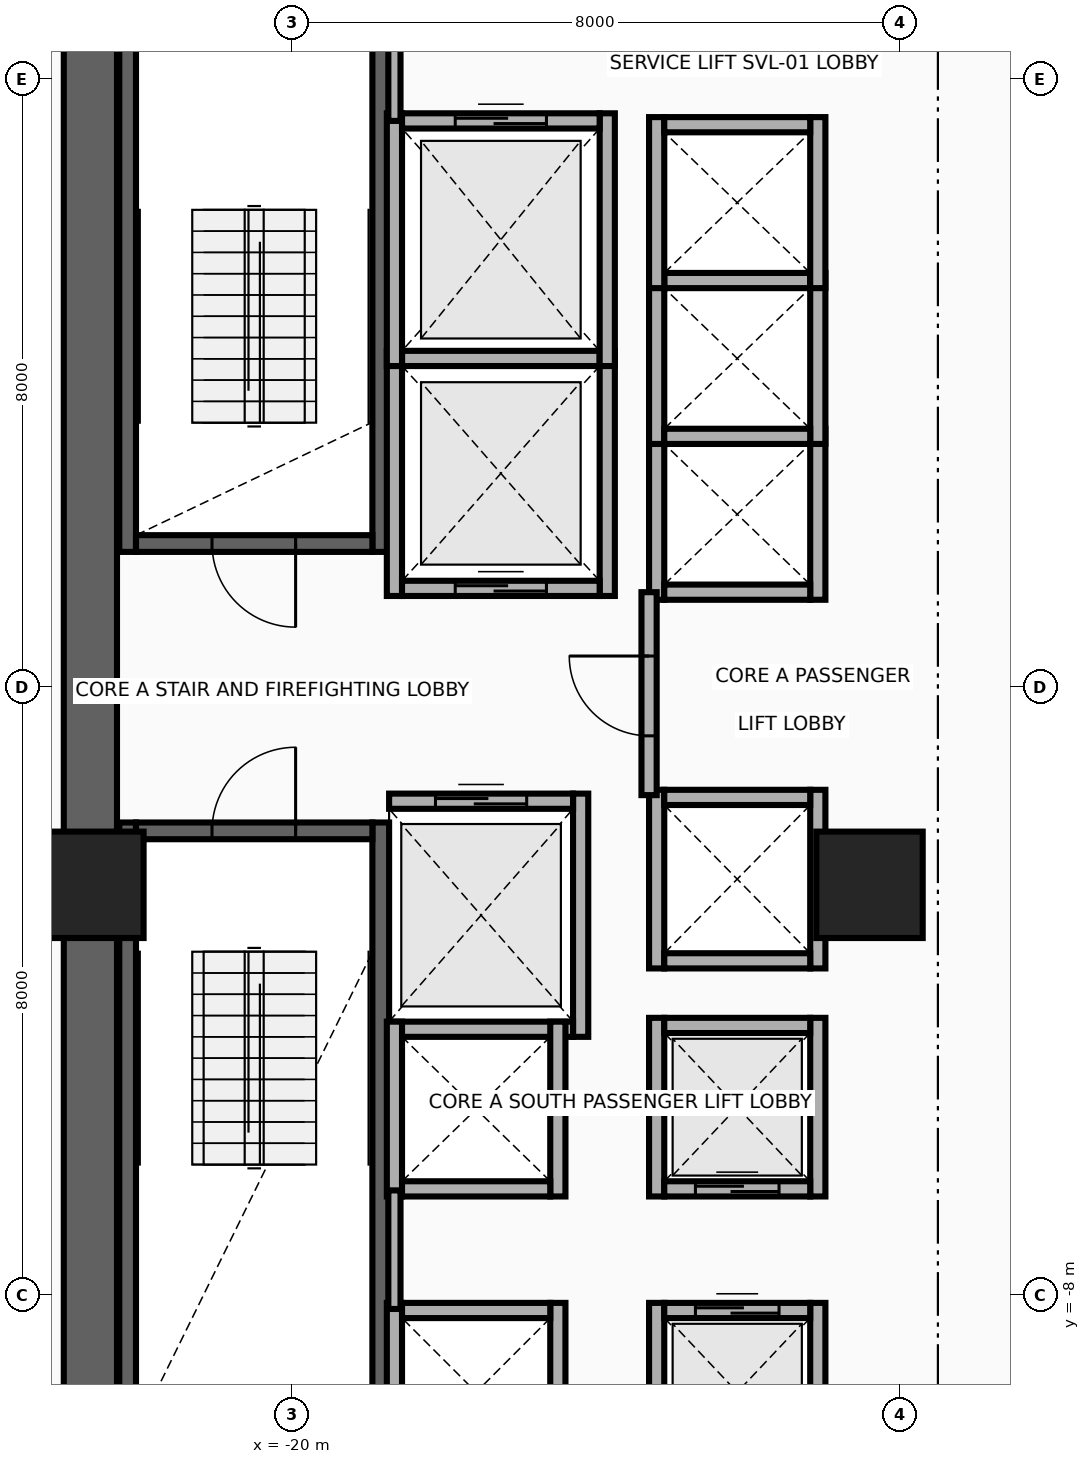
"""IFC4 building model, lengths in metres.
Left out: names, types, materials, properties, quantities, classifications, styles, units other than length and angle.
Written with IfcOpenShell. Run it as: python <this file> out.ifc"""

import sys

from ifc_helpers import new_model, si_unit, direction, frame, frame_2d, origin, origin_2d, place, context, subcontext, project, spatial, rectangle, extrude, source, transform, mapped, element, fill, save


model = new_model("IFC4")
c1 = context("Model", 3, precision=1e-05, world=origin(), true_north=direction((0.0, 1.0)))
c2 = subcontext(c1, "Body", "Model", "MODEL_VIEW")
j1 = project(units=[si_unit("LENGTHUNIT", "METRE"), si_unit("PLANEANGLEUNIT", "RADIAN")], contexts=[c1])
p1 = place(None, origin())
s1 = spatial("IfcSite", under=j1, at=p1, CompositionType="ELEMENT")
p2 = place(p1, origin())
s2 = spatial("IfcBuilding", under=s1, at=p2, CompositionType="ELEMENT")
p3 = place(p2, frame((0.0, 0.0, 26.0)))
s3 = spatial("IfcBuildingStorey", under=s2, at=p3, CompositionType="ELEMENT", Elevation=26.0)
for number, where, z_axis, x_axis in (
    (1, (-22.16, 1.78, 0.0), (0.0, 0.0, 1.0), (0.0, 1.0, 0.0)),
    (2, (-18.83, 1.78, 0.0), (0.0, 0.0, 1.0), (0.0, 1.0, 0.0)),
):
    element("IfcWall", number, at=place(p3, frame(where, z_axis=z_axis, x_axis=x_axis)), inside=s3, PredefinedType="SHEAR", context=c2, shape_type="SweptSolid", body=[
        extrude(rectangle(XDim=8.67, YDim=0.22, at=frame_2d((4.335, 0.0))), origin(), (0.0, 0.0, 1.0), 3.46),
    ])
p4 = place(p3, frame((-22.05, 1.89, 0.0), z_axis=(0.0, 0.0, 1.0), x_axis=(1.0, 0.0, 0.0)))
e3 = element("IfcWall", 3, at=p4, inside=s3, PredefinedType="SHEAR", context=c2, shape_type="SweptSolid", body=[
    extrude(rectangle(XDim=3.11, YDim=0.22, at=frame_2d((1.555, 0.0))), origin(), (0.0, 0.0, 1.0), 3.46),
])
p5 = place(p4, frame((1.0, 0.0, 0.0)))
e4 = element("IfcOpeningElement", 4, at=p5, cuts=e3, PredefinedType="OPENING", context=c2, shape_type="SweptSolid", body=[
    extrude(rectangle(XDim=1.1, YDim=2.15, at=frame_2d((0.55, 1.075))), frame((0.0, 0.125, 0.0), z_axis=(0.0, -1.0, 0.0), x_axis=(1.0, 0.0, 0.0)), (0.0, 0.0, 1.0), 0.25),
])
for number, where, z_axis, x_axis in (
    (5, (-22.16, -10.45, 0.0), (0.0, 0.0, 1.0), (0.0, 1.0, 0.0)),
    (6, (-18.83, -10.45, 0.0), (0.0, 0.0, 1.0), (0.0, 1.0, 0.0)),
):
    element("IfcWall", number, at=place(p3, frame(where, z_axis=z_axis, x_axis=x_axis)), inside=s3, PredefinedType="SHEAR", context=c2, shape_type="SweptSolid", body=[
        extrude(rectangle(XDim=8.67, YDim=0.22, at=frame_2d((4.335, 0.0))), origin(), (0.0, 0.0, 1.0), 3.46),
    ])
p6 = place(p3, frame((-22.05, -1.89, 0.0), z_axis=(0.0, 0.0, 1.0), x_axis=(1.0, 0.0, 0.0)))
e7 = element("IfcWall", 7, at=p6, inside=s3, PredefinedType="SHEAR", context=c2, shape_type="SweptSolid", body=[
    extrude(rectangle(XDim=3.11, YDim=0.22, at=frame_2d((1.555, 0.0))), origin(), (0.0, 0.0, 1.0), 3.46),
])
p7 = place(p6, frame((1.0, 0.0, 0.0)))
e8 = element("IfcOpeningElement", 8, at=p7, cuts=e7, PredefinedType="OPENING", context=c2, shape_type="SweptSolid", body=[
    extrude(rectangle(XDim=1.1, YDim=2.15, at=frame_2d((0.55, 1.075))), frame((0.0, 0.125, 0.0), z_axis=(0.0, -1.0, 0.0), x_axis=(1.0, 0.0, 0.0)), (0.0, 0.0, 1.0), 0.25),
])
p8 = place(p3, frame((-22.65, -11.15, 0.0), z_axis=(0.0, 0.0, 1.0), x_axis=(0.0, 1.0, 0.0)))
e9 = element("IfcWall", 9, at=p8, inside=s3, PredefinedType="SHEAR", context=c2, shape_type="SweptSolid", body=[
    extrude(rectangle(XDim=22.3, YDim=0.7, at=frame_2d((11.15, 0.0))), origin(), (0.0, 0.0, 1.0), 3.46),
])
m1 = source(origin(), c2, "Body", "SweptSolid", [
    extrude(rectangle(XDim=1.4, YDim=1.4, at=origin_2d()), origin(), (0.0, 0.0, 1.0), 3.7),
])
for number, where, z_axis, x_axis in (
    (10, (-22.65, -2.6, 0.0), (0.0, 0.0, 1.0), (1.0, 0.0, 0.0)),
    (11, (-12.4, -2.6, 0.0), (0.0, 0.0, 1.0), (1.0, 0.0, 0.0)),
):
    element("IfcColumn", number, at=place(p3, frame(where, z_axis=z_axis, x_axis=x_axis)), inside=s3, PredefinedType="COLUMN", context=c2, shape_type="MappedRepresentation", body=[
        mapped(m1, transform((0.0, 0.0, 0.0), x_axis=(1.0, 0.0, 0.0), y_axis=(0.0, 1.0, 0.0), z_axis=(0.0, 0.0, 1.0), scale=1.0)),
    ])
for number, where, z_axis, x_axis in (
    (12, (-18.65, 1.2, 0.0), (0.0, 0.0, 1.0), (0.0, 1.0, 0.0)),
    (13, (-15.85, 1.2, 0.0), (0.0, 0.0, 1.0), (0.0, 1.0, 0.0)),
):
    element("IfcWall", number, at=place(p3, frame(where, z_axis=z_axis, x_axis=x_axis)), inside=s3, PredefinedType="MOVABLE", context=c2, shape_type="SweptSolid", body=[
        extrude(rectangle(XDim=3.225, YDim=0.2, at=frame_2d((1.613, 0.0))), origin(), (0.0, 0.0, 1.0), 3.46),
    ])
p9 = place(p3, frame((-18.55, 1.3, 0.0), z_axis=(0.0, 0.0, 1.0), x_axis=(1.0, 0.0, 0.0)))
e14 = element("IfcWall", 14, at=p9, inside=s3, PredefinedType="MOVABLE", context=c2, shape_type="SweptSolid", body=[
    extrude(rectangle(XDim=2.6, YDim=0.2, at=frame_2d((1.3, 0.0))), origin(), (0.0, 0.0, 1.0), 3.46),
])
p10 = place(p9, frame((0.7, 0.0, 0.0)))
e15 = element("IfcOpeningElement", 15, at=p10, cuts=e14, PredefinedType="OPENING", context=c2, shape_type="SweptSolid", body=[
    extrude(rectangle(XDim=1.2, YDim=2.1, at=frame_2d((0.6, 1.05))), frame((0.0, 0.115, 0.0), z_axis=(0.0, -1.0, 0.0), x_axis=(1.0, 0.0, 0.0)), (0.0, 0.0, 1.0), 0.23),
])
p11 = place(p3, frame((-18.55, 4.325, 0.0), z_axis=(0.0, 0.0, 1.0), x_axis=(1.0, 0.0, 0.0)))
e16 = element("IfcWall", 16, at=p11, inside=s3, PredefinedType="MOVABLE", context=c2, shape_type="SweptSolid", body=[
    extrude(rectangle(XDim=2.6, YDim=0.2, at=frame_2d((1.3, 0.0))), origin(), (0.0, 0.0, 1.0), 3.46),
])
p12 = place(p3, frame((-16.2, -4.6, 0.0), z_axis=(0.0, 0.0, 1.0), x_axis=(0.0, 1.0, 0.0)))
e17 = element("IfcWall", 17, at=p12, inside=s3, PredefinedType="MOVABLE", context=c2, shape_type="SweptSolid", body=[
    extrude(rectangle(XDim=3.2, YDim=0.2, at=frame_2d((1.6, 0.0))), origin(), (0.0, 0.0, 1.0), 3.46),
])
p13 = place(p3, frame((-18.72, -4.5, 0.0), z_axis=(0.0, 0.0, 1.0), x_axis=(1.0, 0.0, 0.0)))
e18 = element("IfcWall", 18, at=p13, inside=s3, PredefinedType="MOVABLE", context=c2, shape_type="SweptSolid", body=[
    extrude(rectangle(XDim=2.42, YDim=0.2, at=frame_2d((1.21, 0.0))), origin(), (0.0, 0.0, 1.0), 3.46),
])
p14 = place(p3, frame((-18.72, -1.5, 0.0), z_axis=(0.0, 0.0, 1.0), x_axis=(1.0, 0.0, 0.0)))
e19 = element("IfcWall", 19, at=p14, inside=s3, PredefinedType="MOVABLE", context=c2, shape_type="SweptSolid", body=[
    extrude(rectangle(XDim=2.42, YDim=0.2, at=frame_2d((1.21, 0.0))), origin(), (0.0, 0.0, 1.0), 3.46),
])
p15 = place(p14, frame((0.61, 0.0, 0.0)))
e20 = element("IfcOpeningElement", 20, at=p15, cuts=e19, PredefinedType="OPENING", context=c2, shape_type="SweptSolid", body=[
    extrude(rectangle(XDim=1.2, YDim=2.1, at=frame_2d((0.6, 1.05))), frame((0.0, 0.115, 0.0), z_axis=(0.0, -1.0, 0.0), x_axis=(1.0, 0.0, 0.0)), (0.0, 0.0, 1.0), 0.23),
])
for number, where, z_axis, x_axis in (
    (21, (-18.65, 4.225, 0.0), (0.0, 0.0, 1.0), (0.0, 1.0, 0.0)),
    (22, (-15.85, 4.225, 0.0), (0.0, 0.0, 1.0), (0.0, 1.0, 0.0)),
):
    element("IfcWall", number, at=place(p3, frame(where, z_axis=z_axis, x_axis=x_axis)), inside=s3, PredefinedType="MOVABLE", context=c2, shape_type="SweptSolid", body=[
        extrude(rectangle(XDim=3.325, YDim=0.2, at=frame_2d((1.663, 0.0))), origin(), (0.0, 0.0, 1.0), 3.46),
    ])
p16 = place(p3, frame((-18.55, 7.45, 0.0), z_axis=(0.0, 0.0, 1.0), x_axis=(1.0, 0.0, 0.0)))
e23 = element("IfcWall", 23, at=p16, inside=s3, PredefinedType="MOVABLE", context=c2, shape_type="SweptSolid", body=[
    extrude(rectangle(XDim=2.6, YDim=0.2, at=frame_2d((1.3, 0.0))), origin(), (0.0, 0.0, 1.0), 3.46),
])
p17 = place(p16, frame((0.7, 0.0, 0.0)))
e24 = element("IfcOpeningElement", 24, at=p17, cuts=e23, PredefinedType="OPENING", context=c2, shape_type="SweptSolid", body=[
    extrude(rectangle(XDim=1.2, YDim=2.1, at=frame_2d((0.6, 1.05))), frame((0.0, 0.115, 0.0), z_axis=(0.0, -1.0, 0.0), x_axis=(1.0, 0.0, 0.0)), (0.0, 0.0, 1.0), 0.23),
])
for number, where, z_axis, x_axis in (
    (25, (-15.2, -10.45, 0.0), (0.0, 0.0, 1.0), (0.0, 1.0, 0.0)),
    (26, (-13.08, -10.45, 0.0), (0.0, 0.0, 1.0), (0.0, 1.0, 0.0)),
):
    element("IfcWall", number, at=place(p3, frame(where, z_axis=z_axis, x_axis=x_axis)), inside=s3, PredefinedType="MOVABLE", context=c2, shape_type="SweptSolid", body=[
        extrude(rectangle(XDim=2.35, YDim=0.2, at=frame_2d((1.175, 0.0))), origin(), (0.0, 0.0, 1.0), 2.583),
    ])
p18 = place(p3, frame((-15.1, -8.2, 0.0), z_axis=(0.0, 0.0, 1.0), x_axis=(1.0, 0.0, 0.0)))
e27 = element("IfcWall", 27, at=p18, inside=s3, PredefinedType="MOVABLE", context=c2, shape_type="SweptSolid", body=[
    extrude(rectangle(XDim=1.92, YDim=0.2, at=frame_2d((0.96, 0.0))), origin(), (0.0, 0.0, 1.0), 3.46),
])
p19 = place(p18, frame((0.41, 0.0, 0.0)))
e28 = element("IfcOpeningElement", 28, at=p19, cuts=e27, PredefinedType="OPENING", context=c2, shape_type="SweptSolid", body=[
    extrude(rectangle(XDim=1.1, YDim=2.1, at=frame_2d((0.55, 1.05))), frame((0.0, 0.115, 0.0), z_axis=(0.0, -1.0, 0.0), x_axis=(1.0, 0.0, 0.0)), (0.0, 0.0, 1.0), 0.23),
])
for number, where, z_axis, x_axis in (
    (29, (-15.2, -6.7, 0.0), (0.0, 0.0, 1.0), (0.0, 1.0, 0.0)),
    (30, (-13.08, -6.7, 0.0), (0.0, 0.0, 1.0), (0.0, 1.0, 0.0)),
):
    element("IfcWall", number, at=place(p3, frame(where, z_axis=z_axis, x_axis=x_axis)), inside=s3, PredefinedType="MOVABLE", context=c2, shape_type="SweptSolid", body=[
        extrude(rectangle(XDim=2.35, YDim=0.2, at=frame_2d((1.175, 0.0))), origin(), (0.0, 0.0, 1.0), 3.46),
    ])
p20 = place(p3, frame((-15.1, -6.6, 0.0), z_axis=(0.0, 0.0, 1.0), x_axis=(1.0, 0.0, 0.0)))
e31 = element("IfcWall", 31, at=p20, inside=s3, PredefinedType="MOVABLE", context=c2, shape_type="SweptSolid", body=[
    extrude(rectangle(XDim=1.92, YDim=0.2, at=frame_2d((0.96, 0.0))), origin(), (0.0, 0.0, 1.0), 3.46),
])
p21 = place(p20, frame((0.41, 0.0, 0.0)))
e32 = element("IfcOpeningElement", 32, at=p21, cuts=e31, PredefinedType="OPENING", context=c2, shape_type="SweptSolid", body=[
    extrude(rectangle(XDim=1.1, YDim=2.1, at=frame_2d((0.55, 1.05))), frame((0.0, 0.115, 0.0), z_axis=(0.0, -1.0, 0.0), x_axis=(1.0, 0.0, 0.0)), (0.0, 0.0, 1.0), 0.23),
])
p22 = place(p3, frame((-15.1, -4.45, 0.0), z_axis=(0.0, 0.0, 1.0), x_axis=(1.0, 0.0, 0.0)))
e33 = element("IfcWall", 33, at=p22, inside=s3, PredefinedType="MOVABLE", context=c2, shape_type="SweptSolid", body=[
    extrude(rectangle(XDim=1.92, YDim=0.2, at=frame_2d((0.96, 0.0))), origin(), (0.0, 0.0, 1.0), 3.46),
])
for number, where, z_axis, x_axis in (
    (34, (-18.65, -10.45, 0.0), (0.0, 0.0, 1.0), (0.0, 1.0, 0.0)),
    (35, (-16.5, -10.45, 0.0), (0.0, 0.0, 1.0), (0.0, 1.0, 0.0)),
):
    element("IfcWall", number, at=place(p3, frame(where, z_axis=z_axis, x_axis=x_axis)), inside=s3, PredefinedType="MOVABLE", context=c2, shape_type="SweptSolid", body=[
        extrude(rectangle(XDim=2.35, YDim=0.2, at=frame_2d((1.175, 0.0))), origin(), (0.0, 0.0, 1.0), 2.583),
    ])
p23 = place(p3, frame((-18.55, -8.2, 0.0), z_axis=(0.0, 0.0, 1.0), x_axis=(1.0, 0.0, 0.0)))
e36 = element("IfcWall", 36, at=p23, inside=s3, PredefinedType="MOVABLE", context=c2, shape_type="SweptSolid", body=[
    extrude(rectangle(XDim=1.95, YDim=0.2, at=frame_2d((0.975, 0.0))), origin(), (0.0, 0.0, 1.0), 3.46),
])
for number, where, z_axis, x_axis in (
    (37, (-15.2, 1.15, 0.0), (0.0, 0.0, 1.0), (0.0, 1.0, 0.0)),
    (38, (-13.08, 1.15, 0.0), (0.0, 0.0, 1.0), (0.0, 1.0, 0.0)),
):
    element("IfcWall", number, at=place(p3, frame(where, z_axis=z_axis, x_axis=x_axis)), inside=s3, PredefinedType="MOVABLE", context=c2, shape_type="SweptSolid", body=[
        extrude(rectangle(XDim=2.25, YDim=0.2, at=frame_2d((1.125, 0.0))), origin(), (0.0, 0.0, 1.0), 3.46),
    ])
p24 = place(p3, frame((-15.1, 1.25, 0.0), z_axis=(0.0, 0.0, 1.0), x_axis=(1.0, 0.0, 0.0)))
e39 = element("IfcWall", 39, at=p24, inside=s3, PredefinedType="MOVABLE", context=c2, shape_type="SweptSolid", body=[
    extrude(rectangle(XDim=1.92, YDim=0.2, at=frame_2d((0.96, 0.0))), origin(), (0.0, 0.0, 1.0), 3.46),
])
for number, where, z_axis, x_axis in (
    (40, (-15.2, 3.2, 0.0), (0.0, 0.0, 1.0), (0.0, 1.0, 0.0)),
    (41, (-13.08, 3.2, 0.0), (0.0, 0.0, 1.0), (0.0, 1.0, 0.0)),
):
    element("IfcWall", number, at=place(p3, frame(where, z_axis=z_axis, x_axis=x_axis)), inside=s3, PredefinedType="MOVABLE", context=c2, shape_type="SweptSolid", body=[
        extrude(rectangle(XDim=2.25, YDim=0.2, at=frame_2d((1.125, 0.0))), origin(), (0.0, 0.0, 1.0), 3.46),
    ])
for number, where, z_axis, x_axis in (
    (42, (-15.1, 3.3, 0.0), (0.0, 0.0, 1.0), (1.0, 0.0, 0.0)),
    (43, (-15.1, 5.35, 0.0), (0.0, 0.0, 1.0), (1.0, 0.0, 0.0)),
):
    element("IfcWall", number, at=place(p3, frame(where, z_axis=z_axis, x_axis=x_axis)), inside=s3, PredefinedType="MOVABLE", context=c2, shape_type="SweptSolid", body=[
        extrude(rectangle(XDim=1.92, YDim=0.2, at=frame_2d((0.96, 0.0))), origin(), (0.0, 0.0, 1.0), 3.46),
    ])
for number, where, z_axis, x_axis in (
    (44, (-15.2, 5.25, 0.0), (0.0, 0.0, 1.0), (0.0, 1.0, 0.0)),
    (45, (-13.08, 5.25, 0.0), (0.0, 0.0, 1.0), (0.0, 1.0, 0.0)),
):
    element("IfcWall", number, at=place(p3, frame(where, z_axis=z_axis, x_axis=x_axis)), inside=s3, PredefinedType="MOVABLE", context=c2, shape_type="SweptSolid", body=[
        extrude(rectangle(XDim=2.25, YDim=0.2, at=frame_2d((1.125, 0.0))), origin(), (0.0, 0.0, 1.0), 3.46),
    ])
p25 = place(p3, frame((-15.1, 7.4, 0.0), z_axis=(0.0, 0.0, 1.0), x_axis=(1.0, 0.0, 0.0)))
e46 = element("IfcWall", 46, at=p25, inside=s3, PredefinedType="MOVABLE", context=c2, shape_type="SweptSolid", body=[
    extrude(rectangle(XDim=1.92, YDim=0.2, at=frame_2d((0.96, 0.0))), origin(), (0.0, 0.0, 1.0), 3.46),
])
for number, where, z_axis, x_axis in (
    (47, (-18.65, -6.7, 0.0), (0.0, 0.0, 1.0), (0.0, 1.0, 0.0)),
    (48, (-16.5, -6.7, 0.0), (0.0, 0.0, 1.0), (0.0, 1.0, 0.0)),
):
    element("IfcWall", number, at=place(p3, frame(where, z_axis=z_axis, x_axis=x_axis)), inside=s3, PredefinedType="MOVABLE", context=c2, shape_type="SweptSolid", body=[
        extrude(rectangle(XDim=2.3, YDim=0.2, at=frame_2d((1.15, 0.0))), origin(), (0.0, 0.0, 1.0), 3.46),
    ])
p26 = place(p3, frame((-18.55, -6.6, 0.0), z_axis=(0.0, 0.0, 1.0), x_axis=(1.0, 0.0, 0.0)))
e49 = element("IfcWall", 49, at=p26, inside=s3, PredefinedType="MOVABLE", context=c2, shape_type="SweptSolid", body=[
    extrude(rectangle(XDim=1.95, YDim=0.2, at=frame_2d((0.975, 0.0))), origin(), (0.0, 0.0, 1.0), 3.46),
])
for number, where, z_axis, x_axis in (
    (50, (-15.2, -3.7, 0.0), (0.0, 0.0, 1.0), (0.0, 1.0, 0.0)),
    (51, (-13.08, -3.7, 0.0), (0.0, 0.0, 1.0), (0.0, 1.0, 0.0)),
):
    element("IfcWall", number, at=place(p3, frame(where, z_axis=z_axis, x_axis=x_axis)), inside=s3, PredefinedType="MOVABLE", context=c2, shape_type="SweptSolid", body=[
        extrude(rectangle(XDim=2.35, YDim=0.2, at=frame_2d((1.175, 0.0))), origin(), (0.0, 0.0, 1.0), 3.46),
    ])
for number, where, z_axis, x_axis in (
    (52, (-15.1, -3.6, 0.0), (0.0, 0.0, 1.0), (1.0, 0.0, 0.0)),
    (53, (-15.1, -1.45, 0.0), (0.0, 0.0, 1.0), (1.0, 0.0, 0.0)),
):
    element("IfcWall", number, at=place(p3, frame(where, z_axis=z_axis, x_axis=x_axis)), inside=s3, PredefinedType="MOVABLE", context=c2, shape_type="SweptSolid", body=[
        extrude(rectangle(XDim=1.92, YDim=0.2, at=frame_2d((0.96, 0.0))), origin(), (0.0, 0.0, 1.0), 3.46),
    ])
p27 = place(p3, frame((-15.3, -1.42, 0.0), z_axis=(0.0, 0.0, 1.0), x_axis=(0.0, 1.0, 0.0)))
e54 = element("IfcWall", 54, at=p27, inside=s3, PredefinedType="PARTITIONING", context=c2, shape_type="SweptSolid", body=[
    extrude(rectangle(XDim=2.67, YDim=0.2, at=frame_2d((1.335, 0.0))), origin(), (0.0, 0.0, 1.0), 3.46),
])
p28 = place(p27, frame((0.78, 0.0, 0.0)))
e55 = element("IfcOpeningElement", 55, at=p28, cuts=e54, PredefinedType="OPENING", context=c2, shape_type="SweptSolid", body=[
    extrude(rectangle(XDim=1.05, YDim=2.15, at=frame_2d((0.525, 1.075))), frame((0.0, 0.115, 0.0), z_axis=(0.0, -1.0, 0.0), x_axis=(1.0, 0.0, 0.0)), (0.0, 0.0, 1.0), 0.23),
])
p29 = place(p3, frame((-18.65, 7.45, 0.0), z_axis=(0.0, 0.0, 1.0), x_axis=(0.0, 1.0, 0.0)))
e56 = element("IfcWall", 56, at=p29, inside=s3, PredefinedType="PARTITIONING", context=c2, shape_type="SweptSolid", body=[
    extrude(rectangle(XDim=2.93, YDim=0.16, at=frame_2d((1.465, 0.0))), origin(), (0.0, 0.0, 1.0), 3.46),
])
p30 = place(p3, frame((-18.65, -8.18, 0.0), z_axis=(0.0, 0.0, 1.0), x_axis=(0.0, 1.0, 0.0)))
e57 = element("IfcWall", 57, at=p30, inside=s3, PredefinedType="PARTITIONING", context=c2, shape_type="SweptSolid", body=[
    extrude(rectangle(XDim=1.56, YDim=0.16, at=frame_2d((0.78, 0.0))), origin(), (0.0, 0.0, 1.0), 3.46),
])
p31 = place(p10, origin())
e58 = element("IfcDoor", 58, at=p31, inside=s3, OperationType="DOUBLE_DOOR_SLIDING", PredefinedType="DOOR", context=c2, shape_type="SweptSolid", body=[
    extrude(rectangle(XDim=1.2, YDim=2.1, at=frame_2d((0.6, 1.05))), frame((0.0, 0.025, 0.0), z_axis=(0.0, -1.0, 0.0), x_axis=(1.0, 0.0, 0.0)), (0.0, 0.0, 1.0), 0.05),
])
fill(e15, e58)
p32 = place(p15, origin())
e59 = element("IfcDoor", 59, at=p32, inside=s3, OperationType="DOUBLE_DOOR_SLIDING", PredefinedType="DOOR", context=c2, shape_type="SweptSolid", body=[
    extrude(rectangle(XDim=1.2, YDim=2.1, at=frame_2d((0.6, 1.05))), frame((0.0, 0.025, 0.0), z_axis=(0.0, -1.0, 0.0), x_axis=(1.0, 0.0, 0.0)), (0.0, 0.0, 1.0), 0.05),
])
fill(e20, e59)
p33 = place(p17, origin())
e60 = element("IfcDoor", 60, at=p33, inside=s3, OperationType="DOUBLE_DOOR_SLIDING", PredefinedType="DOOR", context=c2, shape_type="SweptSolid", body=[
    extrude(rectangle(XDim=1.2, YDim=2.1, at=frame_2d((0.6, 1.05))), frame((0.0, 0.025, 0.0), z_axis=(0.0, -1.0, 0.0), x_axis=(1.0, 0.0, 0.0)), (0.0, 0.0, 1.0), 0.05),
])
fill(e24, e60)
p34 = place(p19, origin())
e61 = element("IfcDoor", 61, at=p34, inside=s3, OperationType="DOUBLE_DOOR_SLIDING", PredefinedType="DOOR", context=c2, shape_type="SweptSolid", body=[
    extrude(rectangle(XDim=1.1, YDim=2.1, at=frame_2d((0.55, 1.05))), frame((0.0, 0.025, 0.0), z_axis=(0.0, -1.0, 0.0), x_axis=(1.0, 0.0, 0.0)), (0.0, 0.0, 1.0), 0.05),
])
fill(e28, e61)
p35 = place(p21, origin())
e62 = element("IfcDoor", 62, at=p35, inside=s3, OperationType="DOUBLE_DOOR_SLIDING", PredefinedType="DOOR", context=c2, shape_type="SweptSolid", body=[
    extrude(rectangle(XDim=1.1, YDim=2.1, at=frame_2d((0.55, 1.05))), frame((0.0, 0.025, 0.0), z_axis=(0.0, -1.0, 0.0), x_axis=(1.0, 0.0, 0.0)), (0.0, 0.0, 1.0), 0.05),
])
fill(e32, e62)
p36 = place(p28, origin())
e63 = element("IfcDoor", 63, at=p36, inside=s3, OperationType="SINGLE_SWING_RIGHT", PredefinedType="DOOR", context=c2, shape_type="SweptSolid", body=[
    extrude(rectangle(XDim=1.05, YDim=2.15, at=frame_2d((0.525, 1.075))), frame((0.0, 0.025, 0.0), z_axis=(0.0, -1.0, 0.0), x_axis=(1.0, 0.0, 0.0)), (0.0, 0.0, 1.0), 0.05),
])
fill(e55, e63)
p37 = place(p5, frame((1.1, 0.0, 0.0), z_axis=(0.0, 0.0, 1.0), x_axis=(-1.0, 0.0, 0.0)))
e64 = element("IfcDoor", 64, at=p37, inside=s3, OperationType="SINGLE_SWING_LEFT", PredefinedType="DOOR", context=c2, shape_type="SweptSolid", body=[
    extrude(rectangle(XDim=1.1, YDim=2.15, at=frame_2d((0.55, 1.075))), frame((0.0, 0.025, 0.0), z_axis=(0.0, -1.0, 0.0), x_axis=(1.0, 0.0, 0.0)), (0.0, 0.0, 1.0), 0.05),
])
fill(e4, e64)
p38 = place(p7, origin())
e65 = element("IfcDoor", 65, at=p38, inside=s3, OperationType="SINGLE_SWING_RIGHT", PredefinedType="DOOR", context=c2, shape_type="SweptSolid", body=[
    extrude(rectangle(XDim=1.1, YDim=2.15, at=frame_2d((0.55, 1.075))), frame((0.0, 0.025, 0.0), z_axis=(0.0, -1.0, 0.0), x_axis=(1.0, 0.0, 0.0)), (0.0, 0.0, 1.0), 0.05),
])
fill(e8, e65)
save(model, sys.argv[1])
